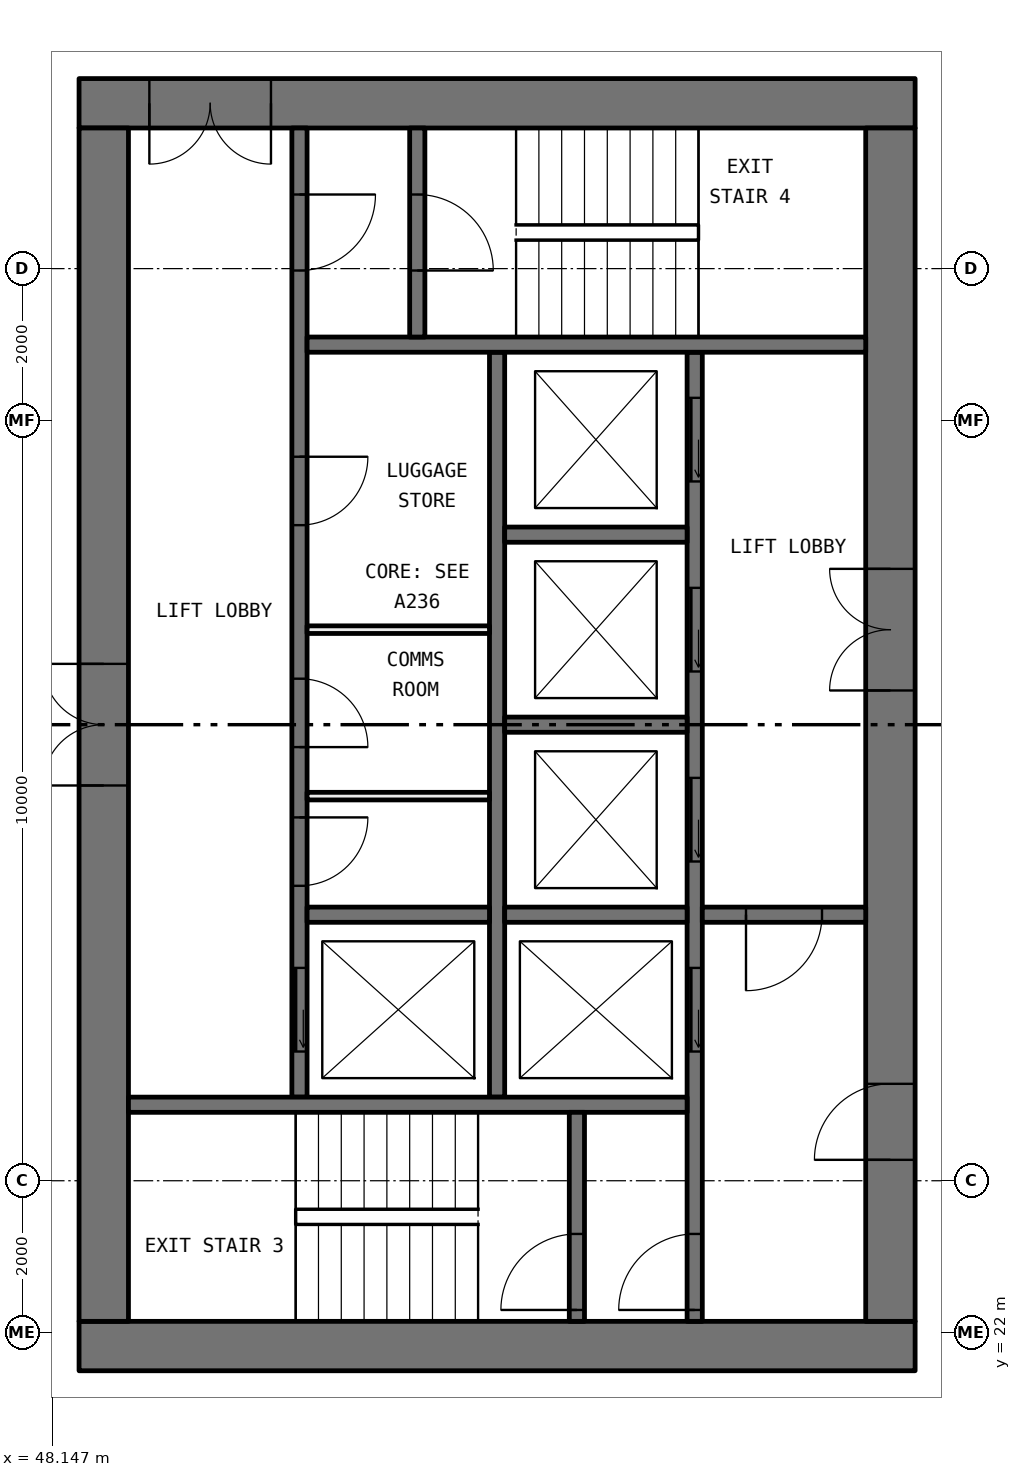
"""IFC4 building model, lengths in metres.
Left out: names, types, materials, properties, quantities, classifications, styles, units other than length and angle.
Written with IfcOpenShell. Run it as: python <this file> out.ifc"""

import sys

from ifc_helpers import new_model, si_unit, direction, frame, frame_2d, origin, place, context, subcontext, project, spatial, rectangle, extrude, element, fill, save


model = new_model("IFC4")
c1 = context("Model", 3, precision=1e-05, world=origin(), true_north=direction((0.0, 1.0)))
c2 = subcontext(c1, "Body", "Model", "MODEL_VIEW")
j1 = project(units=[si_unit("LENGTHUNIT", "METRE"), si_unit("PLANEANGLEUNIT", "RADIAN")], contexts=[c1])
p1 = place(None, origin())
s1 = spatial("IfcSite", under=j1, at=p1, CompositionType="ELEMENT")
p2 = place(p1, origin())
s2 = spatial("IfcBuilding", under=s1, at=p2, CompositionType="ELEMENT")
p3 = place(p2, frame((0.0, 0.0, 134.55)))
s3 = spatial("IfcBuildingStorey", under=s2, at=p3, CompositionType="ELEMENT", Elevation=134.55)
p4 = place(p3, frame((59.5, 21.825, 0.0), z_axis=(0.0, 0.0, 1.0), x_axis=(-1.0, 0.0, 0.0)))
e1 = element("IfcWall", 1, at=p4, inside=s3, PredefinedType="SHEAR", context=c2, shape_type="SweptSolid", body=[
    extrude(rectangle(XDim=11.0, YDim=0.65, at=frame_2d((5.5, 0.0))), origin(), (0.0, 0.0, 1.0), 3.05),
])
p5 = place(p3, frame((59.5, 38.175, 0.0), z_axis=(0.0, 0.0, 1.0), x_axis=(-1.0, 0.0, 0.0)))
e2 = element("IfcWall", 2, at=p5, inside=s3, PredefinedType="SHEAR", context=c2, shape_type="SweptSolid", body=[
    extrude(rectangle(XDim=11.0, YDim=0.65, at=frame_2d((5.5, 0.0))), origin(), (0.0, 0.0, 1.0), 3.05),
])
p6 = place(p5, frame((8.475, 0.0, 0.0)))
e3 = element("IfcOpeningElement", 3, at=p6, cuts=e2, PredefinedType="OPENING", context=c2, shape_type="SweptSolid", body=[
    extrude(rectangle(XDim=1.6, YDim=2.1, at=frame_2d((0.8, 1.05))), frame((0.0, 0.335, 0.0), z_axis=(0.0, -1.0, 0.0), x_axis=(1.0, 0.0, 0.0)), (0.0, 0.0, 1.0), 0.67),
])
p7 = place(p3, frame((59.175, 22.15, 0.0), z_axis=(0.0, 0.0, 1.0), x_axis=(0.0, 1.0, 0.0)))
e4 = element("IfcWall", 4, at=p7, inside=s3, PredefinedType="SHEAR", context=c2, shape_type="SweptSolid", body=[
    extrude(rectangle(XDim=15.7, YDim=0.65, at=frame_2d((7.85, 0.0))), origin(), (0.0, 0.0, 1.0), 3.05),
])
p8 = place(p7, frame((8.3, 0.0, 0.0)))
e5 = element("IfcOpeningElement", 5, at=p8, cuts=e4, PredefinedType="OPENING", context=c2, shape_type="SweptSolid", body=[
    extrude(rectangle(XDim=1.6, YDim=2.1, at=frame_2d((0.8, 1.05))), frame((0.0, 0.335, 0.0), z_axis=(0.0, -1.0, 0.0), x_axis=(1.0, 0.0, 0.0)), (0.0, 0.0, 1.0), 0.67),
])
p9 = place(p7, frame((2.125, 0.0, 0.0)))
e6 = element("IfcOpeningElement", 6, at=p9, cuts=e4, PredefinedType="OPENING", context=c2, shape_type="SweptSolid", body=[
    extrude(rectangle(XDim=1.0, YDim=2.1, at=frame_2d((0.5, 1.05))), frame((0.0, 0.335, 0.0), z_axis=(0.0, -1.0, 0.0), x_axis=(1.0, 0.0, 0.0)), (0.0, 0.0, 1.0), 0.67),
])
p10 = place(p3, frame((48.825, 22.15, 0.0), z_axis=(0.0, 0.0, 1.0), x_axis=(0.0, 1.0, 0.0)))
e7 = element("IfcWall", 7, at=p10, inside=s3, PredefinedType="SHEAR", context=c2, shape_type="SweptSolid", body=[
    extrude(rectangle(XDim=15.7, YDim=0.65, at=frame_2d((7.85, 0.0))), origin(), (0.0, 0.0, 1.0), 3.05),
])
p11 = place(p10, frame((7.05, 0.0, 0.0)))
e8 = element("IfcOpeningElement", 8, at=p11, cuts=e7, PredefinedType="OPENING", context=c2, shape_type="SweptSolid", body=[
    extrude(rectangle(XDim=1.6, YDim=2.1, at=frame_2d((0.8, 1.05))), frame((0.0, 0.335, 0.0), z_axis=(0.0, -1.0, 0.0), x_axis=(1.0, 0.0, 0.0)), (0.0, 0.0, 1.0), 0.67),
])
p12 = place(p3, frame((56.6, 22.15, 0.0), z_axis=(0.0, 0.0, 1.0), x_axis=(0.0, 1.0, 0.0)))
e9 = element("IfcWall", 9, at=p12, inside=s3, PredefinedType="SOLIDWALL", context=c2, shape_type="SweptSolid", body=[
    extrude(rectangle(XDim=12.75, YDim=0.2, at=frame_2d((6.375, 0.0))), origin(), (0.0, 0.0, 1.0), 3.05),
])
p13 = place(p12, frame((3.55, 0.0, 0.0)))
e10 = element("IfcOpeningElement", 10, at=p13, cuts=e9, PredefinedType="OPENING", context=c2, shape_type="SweptSolid", body=[
    extrude(rectangle(XDim=1.1, YDim=2.1, at=frame_2d((0.55, 1.05))), frame((0.0, 0.11, 0.0), z_axis=(0.0, -1.0, 0.0), x_axis=(1.0, 0.0, 0.0)), (0.0, 0.0, 1.0), 0.22),
])
p14 = place(p12, frame((6.05, 0.0, 0.0)))
e11 = element("IfcOpeningElement", 11, at=p14, cuts=e9, PredefinedType="OPENING", context=c2, shape_type="SweptSolid", body=[
    extrude(rectangle(XDim=1.1, YDim=2.1, at=frame_2d((0.55, 1.05))), frame((0.0, 0.11, 0.0), z_axis=(0.0, -1.0, 0.0), x_axis=(1.0, 0.0, 0.0)), (0.0, 0.0, 1.0), 0.22),
])
p15 = place(p12, frame((8.55, 0.0, 0.0)))
e12 = element("IfcOpeningElement", 12, at=p15, cuts=e9, PredefinedType="OPENING", context=c2, shape_type="SweptSolid", body=[
    extrude(rectangle(XDim=1.1, YDim=2.1, at=frame_2d((0.55, 1.05))), frame((0.0, 0.11, 0.0), z_axis=(0.0, -1.0, 0.0), x_axis=(1.0, 0.0, 0.0)), (0.0, 0.0, 1.0), 0.22),
])
p16 = place(p12, frame((11.05, 0.0, 0.0)))
e13 = element("IfcOpeningElement", 13, at=p16, cuts=e9, PredefinedType="OPENING", context=c2, shape_type="SweptSolid", body=[
    extrude(rectangle(XDim=1.1, YDim=2.1, at=frame_2d((0.55, 1.05))), frame((0.0, 0.11, 0.0), z_axis=(0.0, -1.0, 0.0), x_axis=(1.0, 0.0, 0.0)), (0.0, 0.0, 1.0), 0.22),
])
p17 = place(p12, frame((0.15, 0.0, 0.0)))
e14 = element("IfcOpeningElement", 14, at=p17, cuts=e9, PredefinedType="OPENING", context=c2, shape_type="SweptSolid", body=[
    extrude(rectangle(XDim=1.0, YDim=2.1, at=frame_2d((0.5, 1.05))), frame((0.0, 0.11, 0.0), z_axis=(0.0, -1.0, 0.0), x_axis=(1.0, 0.0, 0.0)), (0.0, 0.0, 1.0), 0.22),
])
p18 = place(p3, frame((51.4, 25.1, 0.0), z_axis=(0.0, 0.0, 1.0), x_axis=(0.0, 1.0, 0.0)))
e15 = element("IfcWall", 15, at=p18, inside=s3, PredefinedType="SOLIDWALL", context=c2, shape_type="SweptSolid", body=[
    extrude(rectangle(XDim=12.75, YDim=0.2, at=frame_2d((6.375, 0.0))), origin(), (0.0, 0.0, 1.0), 3.05),
])
p19 = place(p18, frame((0.6, 0.0, 0.0)))
e16 = element("IfcOpeningElement", 16, at=p19, cuts=e15, PredefinedType="OPENING", context=c2, shape_type="SweptSolid", body=[
    extrude(rectangle(XDim=1.1, YDim=2.1, at=frame_2d((0.55, 1.05))), frame((0.0, 0.11, 0.0), z_axis=(0.0, -1.0, 0.0), x_axis=(1.0, 0.0, 0.0)), (0.0, 0.0, 1.0), 0.22),
])
p20 = place(p18, frame((10.875, 0.0, 0.0)))
e17 = element("IfcOpeningElement", 17, at=p20, cuts=e15, PredefinedType="OPENING", context=c2, shape_type="SweptSolid", body=[
    extrude(rectangle(XDim=1.0, YDim=2.1, at=frame_2d((0.5, 1.05))), frame((0.0, 0.11, 0.0), z_axis=(0.0, -1.0, 0.0), x_axis=(1.0, 0.0, 0.0)), (0.0, 0.0, 1.0), 0.22),
])
p21 = place(p18, frame((2.78, 0.0, 0.0)))
e18 = element("IfcOpeningElement", 18, at=p21, cuts=e15, PredefinedType="OPENING", context=c2, shape_type="SweptSolid", body=[
    extrude(rectangle(XDim=0.9, YDim=2.1, at=frame_2d((0.45, 1.05))), frame((0.0, 0.11, 0.0), z_axis=(0.0, -1.0, 0.0), x_axis=(1.0, 0.0, 0.0)), (0.0, 0.0, 1.0), 0.22),
])
p22 = place(p18, frame((4.605, 0.0, 0.0)))
e19 = element("IfcOpeningElement", 19, at=p22, cuts=e15, PredefinedType="OPENING", context=c2, shape_type="SweptSolid", body=[
    extrude(rectangle(XDim=0.9, YDim=2.1, at=frame_2d((0.45, 1.05))), frame((0.0, 0.11, 0.0), z_axis=(0.0, -1.0, 0.0), x_axis=(1.0, 0.0, 0.0)), (0.0, 0.0, 1.0), 0.22),
])
p23 = place(p18, frame((7.525, 0.0, 0.0)))
e20 = element("IfcOpeningElement", 20, at=p23, cuts=e15, PredefinedType="OPENING", context=c2, shape_type="SweptSolid", body=[
    extrude(rectangle(XDim=0.9, YDim=2.1, at=frame_2d((0.45, 1.05))), frame((0.0, 0.11, 0.0), z_axis=(0.0, -1.0, 0.0), x_axis=(1.0, 0.0, 0.0)), (0.0, 0.0, 1.0), 0.22),
])
p24 = place(p3, frame((54.0, 25.1, 0.0), z_axis=(0.0, 0.0, 1.0), x_axis=(0.0, 1.0, 0.0)))
e21 = element("IfcWall", 21, at=p24, inside=s3, PredefinedType="SOLIDWALL", context=c2, shape_type="SweptSolid", body=[
    extrude(rectangle(XDim=9.8, YDim=0.2, at=frame_2d((4.9, 0.0))), origin(), (0.0, 0.0, 1.0), 3.05),
])
for number, where, z_axis, x_axis in (
    (22, (56.5, 25.0, 0.0), (0.0, 0.0, 1.0), (-1.0, 0.0, 0.0)),
    (23, (58.85, 35.0, 0.0), (0.0, 0.0, 1.0), (-1.0, 0.0, 0.0)),
):
    element("IfcWall", number, at=place(p3, frame(where, z_axis=z_axis, x_axis=x_axis)), inside=s3, PredefinedType="SOLIDWALL", context=c2, shape_type="SweptSolid", body=[
        extrude(rectangle(XDim=7.35, YDim=0.2, at=frame_2d((3.675, 0.0))), origin(), (0.0, 0.0, 1.0), 3.05),
    ])
p25 = place(p3, frame((58.85, 27.5, 0.0), z_axis=(0.0, 0.0, 1.0), x_axis=(-1.0, 0.0, 0.0)))
e24 = element("IfcWall", 24, at=p25, inside=s3, PredefinedType="SOLIDWALL", context=c2, shape_type="SweptSolid", body=[
    extrude(rectangle(XDim=2.15, YDim=0.2, at=frame_2d((1.075, 0.0))), origin(), (0.0, 0.0, 1.0), 3.05),
])
p26 = place(p25, frame((0.575, 0.0, 0.0)))
e25 = element("IfcOpeningElement", 25, at=p26, cuts=e24, PredefinedType="OPENING", context=c2, shape_type="SweptSolid", body=[
    extrude(rectangle(XDim=1.0, YDim=2.1, at=frame_2d((0.5, 1.05))), frame((0.0, 0.11, 0.0), z_axis=(0.0, -1.0, 0.0), x_axis=(1.0, 0.0, 0.0)), (0.0, 0.0, 1.0), 0.22),
])
p27 = place(p3, frame((55.05, 22.15, 0.0), z_axis=(0.0, 0.0, 1.0), x_axis=(0.0, 1.0, 0.0)))
e26 = element("IfcWall", 26, at=p27, inside=s3, PredefinedType="SOLIDWALL", context=c2, shape_type="SweptSolid", body=[
    extrude(rectangle(XDim=2.75, YDim=0.2, at=frame_2d((1.375, 0.0))), origin(), (0.0, 0.0, 1.0), 3.05),
])
p28 = place(p27, frame((0.15, 0.0, 0.0)))
e27 = element("IfcOpeningElement", 27, at=p28, cuts=e26, PredefinedType="OPENING", context=c2, shape_type="SweptSolid", body=[
    extrude(rectangle(XDim=1.0, YDim=2.1, at=frame_2d((0.5, 1.05))), frame((0.0, 0.11, 0.0), z_axis=(0.0, -1.0, 0.0), x_axis=(1.0, 0.0, 0.0)), (0.0, 0.0, 1.0), 0.22),
])
p29 = place(p3, frame((52.95, 35.1, 0.0), z_axis=(0.0, 0.0, 1.0), x_axis=(0.0, 1.0, 0.0)))
e28 = element("IfcWall", 28, at=p29, inside=s3, PredefinedType="SOLIDWALL", context=c2, shape_type="SweptSolid", body=[
    extrude(rectangle(XDim=2.75, YDim=0.2, at=frame_2d((1.375, 0.0))), origin(), (0.0, 0.0, 1.0), 3.05),
])
p30 = place(p29, frame((0.875, 0.0, 0.0)))
e29 = element("IfcOpeningElement", 29, at=p30, cuts=e28, PredefinedType="OPENING", context=c2, shape_type="SweptSolid", body=[
    extrude(rectangle(XDim=1.0, YDim=2.1, at=frame_2d((0.5, 1.05))), frame((0.0, 0.11, 0.0), z_axis=(0.0, -1.0, 0.0), x_axis=(1.0, 0.0, 0.0)), (0.0, 0.0, 1.0), 0.22),
])
for number, where, z_axis, x_axis in (
    (30, (56.5, 27.5, 0.0), (0.0, 0.0, 1.0), (-1.0, 0.0, 0.0)),
    (31, (56.5, 30.0, 0.0), (0.0, 0.0, 1.0), (-1.0, 0.0, 0.0)),
    (32, (56.5, 32.5, 0.0), (0.0, 0.0, 1.0), (-1.0, 0.0, 0.0)),
    (33, (53.9, 27.5, 0.0), (0.0, 0.0, 1.0), (-1.0, 0.0, 0.0)),
):
    element("IfcWall", number, at=place(p3, frame(where, z_axis=z_axis, x_axis=x_axis)), inside=s3, PredefinedType="SOLIDWALL", context=c2, shape_type="SweptSolid", body=[
        extrude(rectangle(XDim=2.4, YDim=0.2, at=frame_2d((1.2, 0.0))), origin(), (0.0, 0.0, 1.0), 3.05),
    ])
for number, where, z_axis, x_axis in (
    (34, (53.9, 29.06, 0.0), (0.0, 0.0, 1.0), (-1.0, 0.0, 0.0)),
    (35, (53.9, 31.25, 0.0), (0.0, 0.0, 1.0), (-1.0, 0.0, 0.0)),
):
    element("IfcWall", number, at=place(p3, frame(where, z_axis=z_axis, x_axis=x_axis)), inside=s3, PredefinedType="PARTITIONING", context=c2, shape_type="SweptSolid", body=[
        extrude(rectangle(XDim=2.4, YDim=0.1, at=frame_2d((1.2, 0.0))), origin(), (0.0, 0.0, 1.0), 3.05),
    ])
p31 = place(p19, origin())
e36 = element("IfcDoor", 36, at=p31, inside=s3, OperationType="SLIDING_TO_LEFT", PredefinedType="DOOR", context=c2, shape_type="SweptSolid", body=[
    extrude(rectangle(XDim=1.1, YDim=2.1, at=frame_2d((0.55, 1.05))), frame((0.0, 0.025, 0.0), z_axis=(0.0, -1.0, 0.0), x_axis=(1.0, 0.0, 0.0)), (0.0, 0.0, 1.0), 0.05),
])
fill(e16, e36)
p32 = place(p13, origin())
e37 = element("IfcDoor", 37, at=p32, inside=s3, OperationType="SLIDING_TO_LEFT", PredefinedType="DOOR", context=c2, shape_type="SweptSolid", body=[
    extrude(rectangle(XDim=1.1, YDim=2.1, at=frame_2d((0.55, 1.05))), frame((0.0, 0.025, 0.0), z_axis=(0.0, -1.0, 0.0), x_axis=(1.0, 0.0, 0.0)), (0.0, 0.0, 1.0), 0.05),
])
fill(e10, e37)
p33 = place(p14, origin())
e38 = element("IfcDoor", 38, at=p33, inside=s3, OperationType="SLIDING_TO_LEFT", PredefinedType="DOOR", context=c2, shape_type="SweptSolid", body=[
    extrude(rectangle(XDim=1.1, YDim=2.1, at=frame_2d((0.55, 1.05))), frame((0.0, 0.025, 0.0), z_axis=(0.0, -1.0, 0.0), x_axis=(1.0, 0.0, 0.0)), (0.0, 0.0, 1.0), 0.05),
])
fill(e11, e38)
p34 = place(p15, origin())
e39 = element("IfcDoor", 39, at=p34, inside=s3, OperationType="SLIDING_TO_LEFT", PredefinedType="DOOR", context=c2, shape_type="SweptSolid", body=[
    extrude(rectangle(XDim=1.1, YDim=2.1, at=frame_2d((0.55, 1.05))), frame((0.0, 0.025, 0.0), z_axis=(0.0, -1.0, 0.0), x_axis=(1.0, 0.0, 0.0)), (0.0, 0.0, 1.0), 0.05),
])
fill(e12, e39)
p35 = place(p16, origin())
e40 = element("IfcDoor", 40, at=p35, inside=s3, OperationType="SLIDING_TO_LEFT", PredefinedType="DOOR", context=c2, shape_type="SweptSolid", body=[
    extrude(rectangle(XDim=1.1, YDim=2.1, at=frame_2d((0.55, 1.05))), frame((0.0, 0.025, 0.0), z_axis=(0.0, -1.0, 0.0), x_axis=(1.0, 0.0, 0.0)), (0.0, 0.0, 1.0), 0.05),
])
fill(e13, e40)
p36 = place(p28, origin())
e41 = element("IfcDoor", 41, at=p36, inside=s3, OperationType="SINGLE_SWING_RIGHT", PredefinedType="DOOR", context=c2, shape_type="SweptSolid", body=[
    extrude(rectangle(XDim=1.0, YDim=2.1, at=frame_2d((0.5, 1.05))), frame((0.0, 0.025, 0.0), z_axis=(0.0, -1.0, 0.0), x_axis=(1.0, 0.0, 0.0)), (0.0, 0.0, 1.0), 0.05),
])
fill(e27, e41)
p37 = place(p17, origin())
e42 = element("IfcDoor", 42, at=p37, inside=s3, OperationType="SINGLE_SWING_RIGHT", PredefinedType="DOOR", context=c2, shape_type="SweptSolid", body=[
    extrude(rectangle(XDim=1.0, YDim=2.1, at=frame_2d((0.5, 1.05))), frame((0.0, 0.025, 0.0), z_axis=(0.0, -1.0, 0.0), x_axis=(1.0, 0.0, 0.0)), (0.0, 0.0, 1.0), 0.05),
])
fill(e14, e42)
p38 = place(p20, frame((1.0, 0.0, 0.0), x_axis=(-1.0, 0.0, 0.0)))
e43 = element("IfcDoor", 43, at=p38, inside=s3, OperationType="SINGLE_SWING_RIGHT", PredefinedType="DOOR", context=c2, shape_type="SweptSolid", body=[
    extrude(rectangle(XDim=1.0, YDim=2.1, at=frame_2d((0.5, 1.05))), frame((0.0, 0.025, 0.0), z_axis=(0.0, -1.0, 0.0), x_axis=(1.0, 0.0, 0.0)), (0.0, 0.0, 1.0), 0.05),
])
fill(e17, e43)
p39 = place(p30, frame((1.0, 0.0, 0.0), x_axis=(-1.0, 0.0, 0.0)))
e44 = element("IfcDoor", 44, at=p39, inside=s3, OperationType="SINGLE_SWING_LEFT", PredefinedType="DOOR", context=c2, shape_type="SweptSolid", body=[
    extrude(rectangle(XDim=1.0, YDim=2.1, at=frame_2d((0.5, 1.05))), frame((0.0, 0.025, 0.0), z_axis=(0.0, -1.0, 0.0), x_axis=(1.0, 0.0, 0.0)), (0.0, 0.0, 1.0), 0.05),
])
fill(e29, e44)
p40 = place(p26, origin())
e45 = element("IfcDoor", 45, at=p40, inside=s3, OperationType="SINGLE_SWING_LEFT", PredefinedType="DOOR", context=c2, shape_type="SweptSolid", body=[
    extrude(rectangle(XDim=1.0, YDim=2.1, at=frame_2d((0.5, 1.05))), frame((0.0, 0.025, 0.0), z_axis=(0.0, -1.0, 0.0), x_axis=(1.0, 0.0, 0.0)), (0.0, 0.0, 1.0), 0.05),
])
fill(e25, e45)
p41 = place(p8, origin())
e46 = element("IfcDoor", 46, at=p41, inside=s3, OperationType="DOUBLE_DOOR_SINGLE_SWING", PredefinedType="DOOR", context=c2, shape_type="SweptSolid", body=[
    extrude(rectangle(XDim=1.6, YDim=2.1, at=frame_2d((0.8, 1.05))), frame((0.0, 0.025, 0.0), z_axis=(0.0, -1.0, 0.0), x_axis=(1.0, 0.0, 0.0)), (0.0, 0.0, 1.0), 0.05),
])
fill(e5, e46)
p42 = place(p9, origin())
e47 = element("IfcDoor", 47, at=p42, inside=s3, OperationType="SINGLE_SWING_RIGHT", PredefinedType="DOOR", context=c2, shape_type="SweptSolid", body=[
    extrude(rectangle(XDim=1.0, YDim=2.1, at=frame_2d((0.5, 1.05))), frame((0.0, 0.025, 0.0), z_axis=(0.0, -1.0, 0.0), x_axis=(1.0, 0.0, 0.0)), (0.0, 0.0, 1.0), 0.05),
])
fill(e6, e47)
p43 = place(p6, origin())
e48 = element("IfcDoor", 48, at=p43, inside=s3, OperationType="DOUBLE_DOOR_SINGLE_SWING", PredefinedType="DOOR", context=c2, shape_type="SweptSolid", body=[
    extrude(rectangle(XDim=1.6, YDim=2.1, at=frame_2d((0.8, 1.05))), frame((0.0, 0.025, 0.0), z_axis=(0.0, -1.0, 0.0), x_axis=(1.0, 0.0, 0.0)), (0.0, 0.0, 1.0), 0.05),
])
fill(e3, e48)
p44 = place(p11, origin())
e49 = element("IfcDoor", 49, at=p44, inside=s3, OperationType="DOUBLE_DOOR_SINGLE_SWING", PredefinedType="DOOR", context=c2, shape_type="SweptSolid", body=[
    extrude(rectangle(XDim=1.6, YDim=2.1, at=frame_2d((0.8, 1.05))), frame((0.0, 0.025, 0.0), z_axis=(0.0, -1.0, 0.0), x_axis=(1.0, 0.0, 0.0)), (0.0, 0.0, 1.0), 0.05),
])
fill(e8, e49)
p45 = place(p21, frame((0.9, 0.0, 0.0), x_axis=(-1.0, 0.0, 0.0)))
e50 = element("IfcDoor", 50, at=p45, inside=s3, OperationType="SINGLE_SWING_RIGHT", PredefinedType="DOOR", context=c2, shape_type="SweptSolid", body=[
    extrude(rectangle(XDim=0.9, YDim=2.1, at=frame_2d((0.45, 1.05))), frame((0.0, 0.025, 0.0), z_axis=(0.0, -1.0, 0.0), x_axis=(1.0, 0.0, 0.0)), (0.0, 0.0, 1.0), 0.05),
])
fill(e18, e50)
p46 = place(p22, frame((0.9, 0.0, 0.0), x_axis=(-1.0, 0.0, 0.0)))
e51 = element("IfcDoor", 51, at=p46, inside=s3, OperationType="SINGLE_SWING_LEFT", PredefinedType="DOOR", context=c2, shape_type="SweptSolid", body=[
    extrude(rectangle(XDim=0.9, YDim=2.1, at=frame_2d((0.45, 1.05))), frame((0.0, 0.025, 0.0), z_axis=(0.0, -1.0, 0.0), x_axis=(1.0, 0.0, 0.0)), (0.0, 0.0, 1.0), 0.05),
])
fill(e19, e51)
p47 = place(p23, frame((0.9, 0.0, 0.0), x_axis=(-1.0, 0.0, 0.0)))
e52 = element("IfcDoor", 52, at=p47, inside=s3, OperationType="SINGLE_SWING_RIGHT", PredefinedType="DOOR", context=c2, shape_type="SweptSolid", body=[
    extrude(rectangle(XDim=0.9, YDim=2.1, at=frame_2d((0.45, 1.05))), frame((0.0, 0.025, 0.0), z_axis=(0.0, -1.0, 0.0), x_axis=(1.0, 0.0, 0.0)), (0.0, 0.0, 1.0), 0.05),
])
fill(e20, e52)
save(model, sys.argv[1])
